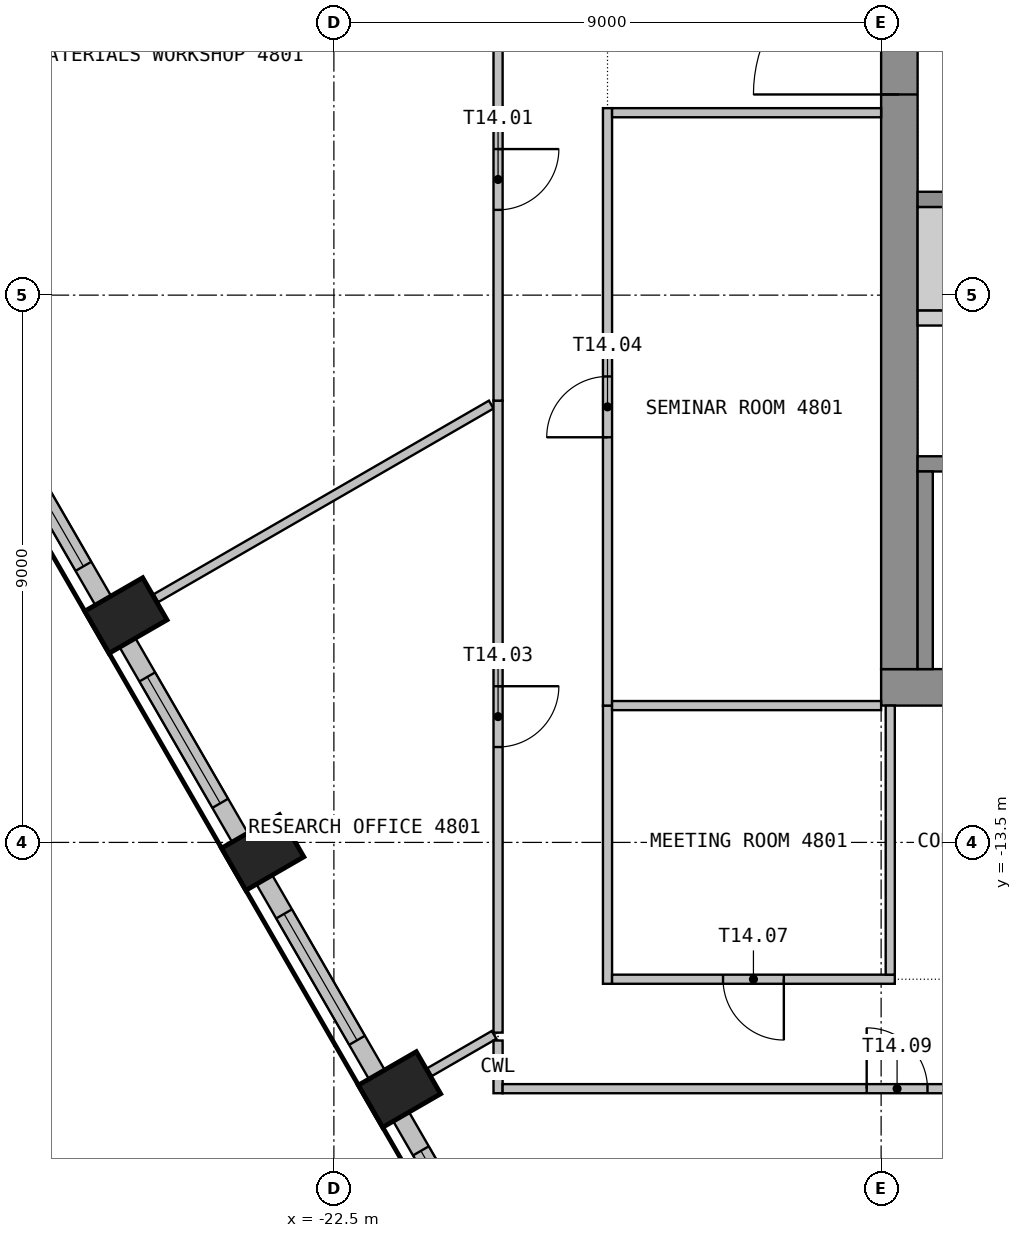
"""IFC4 building model, lengths in metres.
Left out: names, types, materials, properties, quantities, classifications, styles, units other than length and angle.
Written with IfcOpenShell. Run it as: python <this file> out.ifc"""

import sys

from ifc_helpers import new_model, si_unit, direction, frame, frame_2d, origin, origin_2d, place, context, subcontext, project, spatial, polyline, rectangle, outline, extrude, element, fill, save


model = new_model("IFC4")
c1 = context("Model", 3, precision=1e-05, world=origin(), true_north=direction((0.0, 1.0)))
c2 = subcontext(c1, "Body", "Model", "MODEL_VIEW")
j1 = project(units=[si_unit("LENGTHUNIT", "METRE"), si_unit("PLANEANGLEUNIT", "RADIAN")], contexts=[c1])
p1 = place(None, origin())
s1 = spatial("IfcSite", under=j1, at=p1, CompositionType="ELEMENT")
p2 = place(p1, origin())
s2 = spatial("IfcBuilding", under=s1, at=p2, CompositionType="ELEMENT")
p3 = place(p2, frame((0.0, 0.0, 195.6)))
s3 = spatial("IfcBuildingStorey", under=s2, at=p3, CompositionType="ELEMENT", Elevation=195.6)
for number, where, z_axis, x_axis in (
    (1, (-25.921, -9.769, 0.0), (0.0, 0.0, 1.0), (0.5, -0.866, 0.0)),
    (2, (-23.671, -13.666, 0.0), (0.0, 0.0, 1.0), (0.5, -0.866, 0.0)),
    (3, (-21.421, -17.563, 0.0), (0.0, 0.0, 1.0), (0.5, -0.866, 0.0)),
):
    element("IfcColumn", number, at=place(p3, frame(where, z_axis=z_axis, x_axis=x_axis)), inside=s3, PredefinedType="COLUMN", context=c2, shape_type="SweptSolid", body=[
        extrude(rectangle(XDim=0.8, YDim=1.1, at=origin_2d()), origin(), (0.0, 0.0, 1.0), 3.55),
    ])
p4 = place(p3, frame((-28.144, -6.319, 0.0), z_axis=(0.0, 0.0, 1.0), x_axis=(0.500029062817, -0.866008623709, 0.0)))
e4 = element("IfcWall", 4, at=p4, inside=s3, PredefinedType="SOLIDWALL", context=c2, shape_type="SweptSolid", body=[
    extrude(rectangle(XDim=3.699, YDim=0.3, at=frame_2d((1.85, 0.0))), origin(), (0.0, 0.0, 1.0), 3.55),
])
p5 = place(p4, frame((0.649, 0.0, 0.9)))
e5 = element("IfcOpeningElement", 5, at=p5, cuts=e4, PredefinedType="OPENING", context=c2, shape_type="SweptSolid", body=[
    extrude(rectangle(XDim=2.4, YDim=2.1, at=frame_2d((1.2, 1.05))), frame((0.0, 0.16, 0.0), z_axis=(0.0, -1.0, 0.0), x_axis=(1.0, 0.0, 0.0)), (0.0, 0.0, 1.0), 0.32),
])
p6 = place(p3, frame((-25.894, -10.216, 0.0), z_axis=(0.0, 0.0, 1.0), x_axis=(0.500029062817, -0.866008623709, 0.0)))
e6 = element("IfcWall", 6, at=p6, inside=s3, PredefinedType="SOLIDWALL", context=c2, shape_type="SweptSolid", body=[
    extrude(rectangle(XDim=3.699, YDim=0.3, at=frame_2d((1.85, 0.0))), origin(), (0.0, 0.0, 1.0), 3.55),
])
p7 = place(p6, frame((0.649, 0.0, 0.9)))
e7 = element("IfcOpeningElement", 7, at=p7, cuts=e6, PredefinedType="OPENING", context=c2, shape_type="SweptSolid", body=[
    extrude(rectangle(XDim=2.4, YDim=2.1, at=frame_2d((1.2, 1.05))), frame((0.0, 0.16, 0.0), z_axis=(0.0, -1.0, 0.0), x_axis=(1.0, 0.0, 0.0)), (0.0, 0.0, 1.0), 0.32),
])
p8 = place(p3, frame((-23.644, -14.113, 0.0), z_axis=(0.0, 0.0, 1.0), x_axis=(0.500029062817, -0.866008623709, 0.0)))
e8 = element("IfcWall", 8, at=p8, inside=s3, PredefinedType="SOLIDWALL", context=c2, shape_type="SweptSolid", body=[
    extrude(rectangle(XDim=3.699, YDim=0.3, at=frame_2d((1.85, 0.0))), origin(), (0.0, 0.0, 1.0), 3.55),
])
p9 = place(p8, frame((0.649, 0.0, 0.9)))
e9 = element("IfcOpeningElement", 9, at=p9, cuts=e8, PredefinedType="OPENING", context=c2, shape_type="SweptSolid", body=[
    extrude(rectangle(XDim=2.4, YDim=2.1, at=frame_2d((1.2, 1.05))), frame((0.0, 0.16, 0.0), z_axis=(0.0, -1.0, 0.0), x_axis=(1.0, 0.0, 0.0)), (0.0, 0.0, 1.0), 0.32),
])
p10 = place(p3, frame((-21.394, -18.01, 0.0), z_axis=(0.0, 0.0, 1.0), x_axis=(0.500012868213, -0.866017974191, 0.0)))
e10 = element("IfcWall", 10, at=p10, inside=s3, PredefinedType="SOLIDWALL", context=c2, shape_type="SweptSolid", body=[
    extrude(rectangle(XDim=3.396, YDim=0.3, at=frame_2d((1.698, 0.0))), origin(), (0.0, 0.0, 1.0), 3.55),
])
p11 = place(p10, frame((0.649, 0.0, 0.9)))
e11 = element("IfcOpeningElement", 11, at=p11, cuts=e10, PredefinedType="OPENING", context=c2, shape_type="SweptSolid", body=[
    extrude(rectangle(XDim=2.4, YDim=2.1, at=frame_2d((1.2, 1.05))), frame((0.0, 0.16, 0.0), z_axis=(0.0, -1.0, 0.0), x_axis=(1.0, 0.0, 0.0)), (0.0, 0.0, 1.0), 0.32),
])
p12 = place(p3, frame((-13.5, -10.95, 0.0), z_axis=(0.0, 0.0, 1.0), x_axis=(1.0, 0.0, 0.0)))
e12 = element("IfcWall", 12, at=p12, inside=s3, PredefinedType="SHEAR", context=c2, shape_type="SweptSolid", body=[
    extrude(rectangle(XDim=27.0, YDim=0.6, at=frame_2d((13.5, 0.0))), origin(), (0.0, 0.0, 1.0), 3.55),
])
p13 = place(p12, frame((12.3, 0.0, 0.0)))
e13 = element("IfcOpeningElement", 13, at=p13, cuts=e12, PredefinedType="OPENING", context=c2, shape_type="SweptSolid", body=[
    extrude(rectangle(XDim=2.4, YDim=2.1, at=frame_2d((1.2, 1.05))), frame((0.0, 0.31, 0.0), z_axis=(0.0, -1.0, 0.0), x_axis=(1.0, 0.0, 0.0)), (0.0, 0.0, 1.0), 0.62),
])
p14 = place(p12, frame((1.05, 0.0, 0.0)))
e14 = element("IfcOpeningElement", 14, at=p14, cuts=e12, PredefinedType="OPENING", context=c2, shape_type="SweptSolid", body=[
    extrude(rectangle(XDim=1.2, YDim=2.1, at=frame_2d((0.6, 1.05))), frame((0.0, 0.31, 0.0), z_axis=(0.0, -1.0, 0.0), x_axis=(1.0, 0.0, 0.0)), (0.0, 0.0, 1.0), 0.62),
])
p15 = place(p12, frame((24.75, 0.0, 0.0)))
e15 = element("IfcOpeningElement", 15, at=p15, cuts=e12, PredefinedType="OPENING", context=c2, shape_type="SweptSolid", body=[
    extrude(rectangle(XDim=1.2, YDim=2.1, at=frame_2d((0.6, 1.05))), frame((0.0, 0.31, 0.0), z_axis=(0.0, -1.0, 0.0), x_axis=(1.0, 0.0, 0.0)), (0.0, 0.0, 1.0), 0.62),
])
p16 = place(p3, frame((-13.2, -10.65, 0.0), z_axis=(0.0, 0.0, 1.0), x_axis=(0.0, 1.0, 0.0)))
e16 = element("IfcWall", 16, at=p16, inside=s3, PredefinedType="SHEAR", context=c2, shape_type="SweptSolid", body=[
    extrude(rectangle(XDim=21.3, YDim=0.6, at=frame_2d((10.65, 0.0))), origin(), (0.0, 0.0, 1.0), 3.55),
])
p17 = place(p16, frame((9.45, 0.0, 0.0)))
e17 = element("IfcOpeningElement", 17, at=p17, cuts=e16, PredefinedType="OPENING", context=c2, shape_type="SweptSolid", body=[
    extrude(rectangle(XDim=2.4, YDim=2.1, at=frame_2d((1.2, 1.05))), frame((0.0, 0.31, 0.0), z_axis=(0.0, -1.0, 0.0), x_axis=(1.0, 0.0, 0.0)), (0.0, 0.0, 1.0), 0.62),
])
p18 = place(p3, origin())
e18 = element("IfcWall", 18, at=p18, inside=s3, PredefinedType="SHEAR", context=c2, shape_type="SweptSolid", body=[
    extrude(outline(polyline([(-12.9, -5.0), (-4.075, -5.0), (-4.075, -4.75), (-12.9, -4.75), (-12.9, -5.0)])), origin(), (0.0, 0.0, 1.0), 3.55),
])
p19 = place(p3, origin())
e19 = element("IfcWall", 19, at=p19, inside=s3, PredefinedType="SHEAR", context=c2, shape_type="SweptSolid", body=[
    extrude(outline(polyline([(-12.9, -4.75), (-12.475, -4.75), (-12.475, -3.05), (-12.9, -3.05), (-12.9, -4.75)])), origin(), (0.0, 0.0, 1.0), 3.55),
])
p20 = place(p3, frame((-12.9, -2.925, 0.0), z_axis=(0.0, 0.0, 1.0), x_axis=(1.0, 0.0, 0.0)))
e20 = element("IfcWall", 20, at=p20, inside=s3, PredefinedType="SHEAR", context=c2, shape_type="SweptSolid", body=[
    extrude(rectangle(XDim=8.825, YDim=0.25, at=frame_2d((4.413, 0.0))), origin(), (0.0, 0.0, 1.0), 3.55),
])
p21 = place(p20, frame((1.1, 0.0, 0.0)))
e21 = element("IfcOpeningElement", 21, at=p21, cuts=e20, PredefinedType="OPENING", context=c2, shape_type="SweptSolid", body=[
    extrude(rectangle(XDim=1.2, YDim=2.1, at=frame_2d((0.6, 1.05))), frame((0.0, 0.135, 0.0), z_axis=(0.0, -1.0, 0.0), x_axis=(1.0, 0.0, 0.0)), (0.0, 0.0, 1.0), 0.27),
])
p22 = place(p20, frame((3.9, 0.0, 0.0)))
e22 = element("IfcOpeningElement", 22, at=p22, cuts=e20, PredefinedType="OPENING", context=c2, shape_type="SweptSolid", body=[
    extrude(rectangle(XDim=1.2, YDim=2.1, at=frame_2d((0.6, 1.05))), frame((0.0, 0.135, 0.0), z_axis=(0.0, -1.0, 0.0), x_axis=(1.0, 0.0, 0.0)), (0.0, 0.0, 1.0), 0.27),
])
p23 = place(p20, frame((6.7, 0.0, 0.0)))
e23 = element("IfcOpeningElement", 23, at=p23, cuts=e20, PredefinedType="OPENING", context=c2, shape_type="SweptSolid", body=[
    extrude(rectangle(XDim=1.2, YDim=2.1, at=frame_2d((0.6, 1.05))), frame((0.0, 0.135, 0.0), z_axis=(0.0, -1.0, 0.0), x_axis=(1.0, 0.0, 0.0)), (0.0, 0.0, 1.0), 0.27),
])
p24 = place(p3, frame((-12.9, -7.275, 0.0), z_axis=(0.0, 0.0, 1.0), x_axis=(1.0, 0.0, 0.0)))
e24 = element("IfcWall", 24, at=p24, inside=s3, PredefinedType="SHEAR", context=c2, shape_type="SweptSolid", body=[
    extrude(rectangle(XDim=10.1, YDim=0.25, at=frame_2d((5.05, 0.0))), origin(), (0.0, 0.0, 1.0), 3.55),
])
p25 = place(p24, frame((0.45, 0.0, 0.0)))
e25 = element("IfcOpeningElement", 25, at=p25, cuts=e24, PredefinedType="OPENING", context=c2, shape_type="SweptSolid", body=[
    extrude(rectangle(XDim=1.2, YDim=2.1, at=frame_2d((0.6, 1.05))), frame((0.0, 0.135, 0.0), z_axis=(0.0, -1.0, 0.0), x_axis=(1.0, 0.0, 0.0)), (0.0, 0.0, 1.0), 0.27),
])
p26 = place(p3, frame((-12.775, -10.65, 0.0), z_axis=(0.0, 0.0, 1.0), x_axis=(0.0, 1.0, 0.0)))
e26 = element("IfcWall", 26, at=p26, inside=s3, PredefinedType="SHEAR", context=c2, shape_type="SweptSolid", body=[
    extrude(rectangle(XDim=3.25, YDim=0.25, at=frame_2d((1.625, 0.0))), origin(), (0.0, 0.0, 1.0), 3.55),
])
p27 = place(p3, frame((-19.913, -6.3, 0.0), z_axis=(0.0, 0.0, 1.0), x_axis=(-0.866011921086, -0.500023351992, 0.0)))
e27 = element("IfcWall", 27, at=p27, inside=s3, PredefinedType="PARTITIONING", context=c2, shape_type="SweptSolid", body=[
    extrude(rectangle(XDim=6.368, YDim=0.15, at=frame_2d((3.184, 0.0))), origin(), (0.0, 0.0, 1.0), 3.55),
])
p28 = place(p3, frame((-19.865, -16.666, 0.0), z_axis=(0.0, 0.0, 1.0), x_axis=(-0.866202157257, -0.499693728962, 0.0)))
e28 = element("IfcWall", 28, at=p28, inside=s3, PredefinedType="PARTITIONING", context=c2, shape_type="SweptSolid", body=[
    extrude(rectangle(XDim=1.226, YDim=0.15, at=frame_2d((0.613, 0.0))), origin(), (0.0, 0.0, 1.0), 3.55),
])
p29 = place(p3, frame((-19.8, -16.758, 0.0), z_axis=(0.0, 0.0, 1.0), x_axis=(0.0, -1.0, 0.0)))
e29 = element("IfcWall", 29, at=p29, inside=s3, PredefinedType="PARTITIONING", context=c2, shape_type="SweptSolid", body=[
    extrude(rectangle(XDim=0.867, YDim=0.15, at=frame_2d((0.434, 0.0))), origin(), (0.0, 0.0, 1.0), 3.55),
])
p30 = place(p3, frame((-19.725, -17.55, 0.0), z_axis=(0.0, 0.0, 1.0), x_axis=(1.0, 0.0, 0.0)))
e30 = element("IfcWall", 30, at=p30, inside=s3, PredefinedType="PARTITIONING", context=c2, shape_type="SweptSolid", body=[
    extrude(rectangle(XDim=12.975, YDim=0.15, at=frame_2d((6.488, 0.0))), origin(), (0.0, 0.0, 1.0), 3.55),
])
p31 = place(p30, frame((5.988, 0.0, 0.0)))
e31 = element("IfcOpeningElement", 31, at=p31, cuts=e30, PredefinedType="OPENING", context=c2, shape_type="SweptSolid", body=[
    extrude(rectangle(XDim=1.0, YDim=2.1, at=frame_2d((0.5, 1.05))), frame((0.0, 0.085, 0.0), z_axis=(0.0, -1.0, 0.0), x_axis=(1.0, 0.0, 0.0)), (0.0, 0.0, 1.0), 0.17),
])
p32 = place(p3, frame((-19.8, -6.235, 0.0), z_axis=(0.0, 0.0, 1.0), x_axis=(0.0, -1.0, 0.0)))
e32 = element("IfcWall", 32, at=p32, inside=s3, PredefinedType="PARTITIONING", context=c2, shape_type="SweptSolid", body=[
    extrude(rectangle(XDim=10.393, YDim=0.15, at=frame_2d((5.196, 0.0))), origin(), (0.0, 0.0, 1.0), 3.55),
])
p33 = place(p32, frame((4.697, 0.0, 0.0)))
e33 = element("IfcOpeningElement", 33, at=p33, cuts=e32, PredefinedType="OPENING", context=c2, shape_type="SweptSolid", body=[
    extrude(rectangle(XDim=1.0, YDim=2.1, at=frame_2d((0.5, 1.05))), frame((0.0, 0.085, 0.0), z_axis=(0.0, -1.0, 0.0), x_axis=(1.0, 0.0, 0.0)), (0.0, 0.0, 1.0), 0.17),
])
p34 = place(p3, frame((-19.8, 1.039, 0.0), z_axis=(0.0, 0.0, 1.0), x_axis=(0.0, -1.0, 0.0)))
e34 = element("IfcWall", 34, at=p34, inside=s3, PredefinedType="PARTITIONING", context=c2, shape_type="SweptSolid", body=[
    extrude(rectangle(XDim=7.274, YDim=0.15, at=frame_2d((3.637, 0.0))), origin(), (0.0, 0.0, 1.0), 3.55),
])
p35 = place(p34, frame((3.137, 0.0, 0.0)))
e35 = element("IfcOpeningElement", 35, at=p35, cuts=e34, PredefinedType="OPENING", context=c2, shape_type="SweptSolid", body=[
    extrude(rectangle(XDim=1.0, YDim=2.1, at=frame_2d((0.5, 1.05))), frame((0.0, 0.085, 0.0), z_axis=(0.0, -1.0, 0.0), x_axis=(1.0, 0.0, 0.0)), (0.0, 0.0, 1.0), 0.17),
])
p36 = place(p3, frame((-18.0, -15.825, 0.0), z_axis=(0.0, 0.0, 1.0), x_axis=(0.0, 1.0, 0.0)))
e36 = element("IfcWall", 36, at=p36, inside=s3, PredefinedType="PARTITIONING", context=c2, shape_type="SweptSolid", body=[
    extrude(rectangle(XDim=4.575, YDim=0.15, at=frame_2d((2.288, 0.0))), origin(), (0.0, 0.0, 1.0), 3.55),
])
p37 = place(p3, frame((-13.275, -15.75, 0.0), z_axis=(0.0, 0.0, 1.0), x_axis=(-1.0, 0.0, 0.0)))
e37 = element("IfcWall", 37, at=p37, inside=s3, PredefinedType="PARTITIONING", context=c2, shape_type="SweptSolid", body=[
    extrude(rectangle(XDim=4.65, YDim=0.15, at=frame_2d((2.325, 0.0))), origin(), (0.0, 0.0, 1.0), 3.55),
])
p38 = place(p37, frame((1.825, 0.0, 0.0)))
e38 = element("IfcOpeningElement", 38, at=p38, cuts=e37, PredefinedType="OPENING", context=c2, shape_type="SweptSolid", body=[
    extrude(rectangle(XDim=1.0, YDim=2.1, at=frame_2d((0.5, 1.05))), frame((0.0, 0.085, 0.0), z_axis=(0.0, -1.0, 0.0), x_axis=(1.0, 0.0, 0.0)), (0.0, 0.0, 1.0), 0.17),
])
p39 = place(p3, frame((-18.0, -11.25, 0.0), z_axis=(0.0, 0.0, 1.0), x_axis=(0.0, 1.0, 0.0)))
e39 = element("IfcWall", 39, at=p39, inside=s3, PredefinedType="PARTITIONING", context=c2, shape_type="SweptSolid", body=[
    extrude(rectangle(XDim=9.825, YDim=0.15, at=frame_2d((4.913, 0.0))), origin(), (0.0, 0.0, 1.0), 3.55),
])
p40 = place(p39, frame((4.413, 0.0, 0.0)))
e40 = element("IfcOpeningElement", 40, at=p40, cuts=e39, PredefinedType="OPENING", context=c2, shape_type="SweptSolid", body=[
    extrude(rectangle(XDim=1.0, YDim=2.1, at=frame_2d((0.5, 1.05))), frame((0.0, 0.085, 0.0), z_axis=(0.0, -1.0, 0.0), x_axis=(1.0, 0.0, 0.0)), (0.0, 0.0, 1.0), 0.17),
])
for number, where, z_axis, x_axis in (
    (41, (-13.5, -11.25, 0.0), (0.0, 0.0, 1.0), (-1.0, 0.0, 0.0)),
    (42, (-17.925, -1.5, 0.0), (0.0, 0.0, 1.0), (1.0, 0.0, 0.0)),
    (43, (-13.35, -11.25, 0.0), (0.0, 0.0, 1.0), (0.0, -1.0, 0.0)),
):
    element("IfcWall", number, at=place(p3, frame(where, z_axis=z_axis, x_axis=x_axis)), inside=s3, PredefinedType="PARTITIONING", context=c2, shape_type="SweptSolid", body=[
        extrude(rectangle(XDim=4.425, YDim=0.15, at=frame_2d((2.212, 0.0))), origin(), (0.0, 0.0, 1.0), 3.55),
    ])
p41 = place(p5, origin())
e44 = element("IfcWindow", 44, at=p41, inside=s3, PartitioningType="SINGLE_PANEL", PredefinedType="WINDOW", context=c2, shape_type="SweptSolid", body=[
    extrude(rectangle(XDim=2.4, YDim=2.1, at=frame_2d((1.2, 1.05))), frame((0.0, 0.03, 0.0), z_axis=(0.0, -1.0, 0.0), x_axis=(1.0, 0.0, 0.0)), (0.0, 0.0, 1.0), 0.06),
])
fill(e5, e44)
p42 = place(p7, origin())
e45 = element("IfcWindow", 45, at=p42, inside=s3, PartitioningType="SINGLE_PANEL", PredefinedType="WINDOW", context=c2, shape_type="SweptSolid", body=[
    extrude(rectangle(XDim=2.4, YDim=2.1, at=frame_2d((1.2, 1.05))), frame((0.0, 0.03, 0.0), z_axis=(0.0, -1.0, 0.0), x_axis=(1.0, 0.0, 0.0)), (0.0, 0.0, 1.0), 0.06),
])
fill(e7, e45)
p43 = place(p9, origin())
e46 = element("IfcWindow", 46, at=p43, inside=s3, PartitioningType="SINGLE_PANEL", PredefinedType="WINDOW", context=c2, shape_type="SweptSolid", body=[
    extrude(rectangle(XDim=2.4, YDim=2.1, at=frame_2d((1.2, 1.05))), frame((0.0, 0.03, 0.0), z_axis=(0.0, -1.0, 0.0), x_axis=(1.0, 0.0, 0.0)), (0.0, 0.0, 1.0), 0.06),
])
fill(e9, e46)
p44 = place(p11, origin())
e47 = element("IfcWindow", 47, at=p44, inside=s3, PartitioningType="SINGLE_PANEL", PredefinedType="WINDOW", context=c2, shape_type="SweptSolid", body=[
    extrude(rectangle(XDim=2.4, YDim=2.1, at=frame_2d((1.2, 1.05))), frame((0.0, 0.03, 0.0), z_axis=(0.0, -1.0, 0.0), x_axis=(1.0, 0.0, 0.0)), (0.0, 0.0, 1.0), 0.06),
])
fill(e11, e47)
p45 = place(p17, origin())
e48 = element("IfcDoor", 48, at=p45, inside=s3, OperationType="DOUBLE_DOOR_DOUBLE_SWING", PredefinedType="DOOR", context=c2, shape_type="SweptSolid", body=[
    extrude(rectangle(XDim=2.4, YDim=2.1, at=frame_2d((1.2, 1.05))), frame((0.0, 0.025, 0.0), z_axis=(0.0, -1.0, 0.0), x_axis=(1.0, 0.0, 0.0)), (0.0, 0.0, 1.0), 0.05),
])
fill(e17, e48)
p46 = place(p35, origin())
e49 = element("IfcDoor", 49, at=p46, inside=s3, OperationType="SINGLE_SWING_RIGHT", PredefinedType="DOOR", context=c2, shape_type="SweptSolid", body=[
    extrude(rectangle(XDim=1.0, YDim=2.1, at=frame_2d((0.5, 1.05))), frame((0.0, 0.025, 0.0), z_axis=(0.0, -1.0, 0.0), x_axis=(1.0, 0.0, 0.0)), (0.0, 0.0, 1.0), 0.05),
])
fill(e35, e49)
p47 = place(p33, origin())
e50 = element("IfcDoor", 50, at=p47, inside=s3, OperationType="SINGLE_SWING_LEFT", PredefinedType="DOOR", context=c2, shape_type="SweptSolid", body=[
    extrude(rectangle(XDim=1.0, YDim=2.1, at=frame_2d((0.5, 1.05))), frame((0.0, 0.025, 0.0), z_axis=(0.0, -1.0, 0.0), x_axis=(1.0, 0.0, 0.0)), (0.0, 0.0, 1.0), 0.05),
])
fill(e33, e50)
p48 = place(p40, origin())
e51 = element("IfcDoor", 51, at=p48, inside=s3, OperationType="SINGLE_SWING_RIGHT", PredefinedType="DOOR", context=c2, shape_type="SweptSolid", body=[
    extrude(rectangle(XDim=1.0, YDim=2.1, at=frame_2d((0.5, 1.05))), frame((0.0, 0.025, 0.0), z_axis=(0.0, -1.0, 0.0), x_axis=(1.0, 0.0, 0.0)), (0.0, 0.0, 1.0), 0.05),
])
fill(e40, e51)
p49 = place(p38, origin())
e52 = element("IfcDoor", 52, at=p49, inside=s3, OperationType="SINGLE_SWING_RIGHT", PredefinedType="DOOR", context=c2, shape_type="SweptSolid", body=[
    extrude(rectangle(XDim=1.0, YDim=2.1, at=frame_2d((0.5, 1.05))), frame((0.0, 0.025, 0.0), z_axis=(0.0, -1.0, 0.0), x_axis=(1.0, 0.0, 0.0)), (0.0, 0.0, 1.0), 0.05),
])
fill(e38, e52)
p50 = place(p31, origin())
e53 = element("IfcDoor", 53, at=p50, inside=s3, OperationType="SINGLE_SWING_RIGHT", PredefinedType="DOOR", context=c2, shape_type="SweptSolid", body=[
    extrude(rectangle(XDim=1.0, YDim=2.1, at=frame_2d((0.5, 1.05))), frame((0.0, 0.025, 0.0), z_axis=(0.0, -1.0, 0.0), x_axis=(1.0, 0.0, 0.0)), (0.0, 0.0, 1.0), 0.05),
])
fill(e31, e53)
save(model, sys.argv[1])
